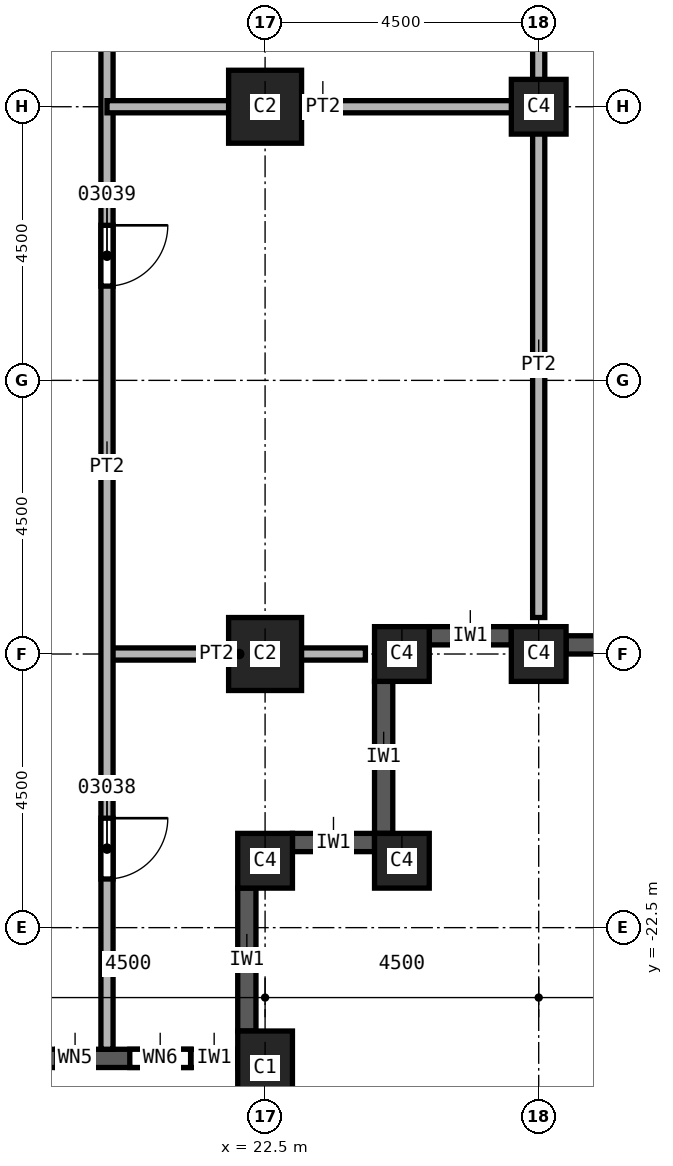
"""IFC4 building model, lengths in metres.
Left out: names, types, materials, properties, quantities, classifications, styles, units other than length and angle.
Written with IfcOpenShell. Run it as: python <this file> out.ifc"""

import sys

from ifc_helpers import new_model, si_unit, direction, frame, frame_2d, origin, origin_2d, place, context, subcontext, project, spatial, rectangle, extrude, element, fill, save


model = new_model("IFC4")
c1 = context("Model", 3, precision=1e-05, world=origin(), true_north=direction((0.0, 1.0)))
c2 = subcontext(c1, "Body", "Model", "MODEL_VIEW")
j1 = project(units=[si_unit("LENGTHUNIT", "METRE"), si_unit("PLANEANGLEUNIT", "RADIAN")], contexts=[c1])
p1 = place(None, origin())
s1 = spatial("IfcSite", under=j1, at=p1, CompositionType="ELEMENT")
p2 = place(p1, origin())
s2 = spatial("IfcBuilding", under=s1, at=p2, CompositionType="ELEMENT")
p3 = place(p2, frame((0.0, 0.0, 92.0)))
s3 = spatial("IfcBuildingStorey", under=s2, at=p3, CompositionType="ELEMENT", Elevation=92.0)
for number, where, z_axis, x_axis in (
    (1, (22.5, -9.0, 0.0), (0.0, 0.0, 1.0), (1.0, 0.0, 0.0)),
    (2, (22.5, -18.0, 0.0), (0.0, 0.0, 1.0), (1.0, 0.0, 0.0)),
):
    element("IfcColumn", number, at=place(p3, frame(where, z_axis=z_axis, x_axis=x_axis)), inside=s3, PredefinedType="COLUMN", context=c2, shape_type="SweptSolid", body=[
        extrude(rectangle(XDim=1.2, YDim=1.2, at=origin_2d()), origin(), (0.0, 0.0, 1.0), 3.7),
    ])
for number, where, z_axis, x_axis in (
    (3, (27.0, -9.0, 0.0), (0.0, 0.0, 1.0), (1.0, 0.0, 0.0)),
    (4, (27.0, -18.0, 0.0), (0.0, 0.0, 1.0), (1.0, 0.0, 0.0)),
):
    element("IfcColumn", number, at=place(p3, frame(where, z_axis=z_axis, x_axis=x_axis)), inside=s3, PredefinedType="COLUMN", context=c2, shape_type="SweptSolid", body=[
        extrude(rectangle(XDim=0.9, YDim=0.9, at=origin_2d()), origin(), (0.0, 0.0, 1.0), 3.7),
    ])
p4 = place(p3, frame((22.5, -24.8, 0.0), z_axis=(0.0, 0.0, 1.0), x_axis=(1.0, 0.0, 0.0)))
e5 = element("IfcColumn", 5, at=p4, inside=s3, PredefinedType="COLUMN", context=c2, shape_type="SweptSolid", body=[
    extrude(rectangle(XDim=0.9, YDim=1.2, at=origin_2d()), origin(), (0.0, 0.0, 1.0), 3.7),
])
for number, where, z_axis, x_axis in (
    (6, (22.5, -21.4, 0.0), (0.0, 0.0, 1.0), (1.0, 0.0, 0.0)),
    (7, (24.75, -21.4, 0.0), (0.0, 0.0, 1.0), (1.0, 0.0, 0.0)),
    (8, (24.75, -18.0, 0.0), (0.0, 0.0, 1.0), (1.0, 0.0, 0.0)),
):
    element("IfcColumn", number, at=place(p3, frame(where, z_axis=z_axis, x_axis=x_axis)), inside=s3, PredefinedType="COLUMN", context=c2, shape_type="SweptSolid", body=[
        extrude(rectangle(XDim=0.9, YDim=0.9, at=origin_2d()), origin(), (0.0, 0.0, 1.0), 3.7),
    ])
p5 = place(p3, frame((18.45, -24.65, 0.0), z_axis=(0.0, 0.0, 1.0), x_axis=(1.0, 0.0, 0.0)))
e9 = element("IfcWall", 9, at=p5, inside=s3, PredefinedType="SOLIDWALL", context=c2, shape_type="SweptSolid", body=[
    extrude(rectangle(XDim=3.6, YDim=0.3, at=frame_2d((1.8, 0.0))), origin(), (0.0, 0.0, 1.0), 3.1),
])
p6 = place(p5, frame((0.625, 0.0, 0.8)))
e10 = element("IfcOpeningElement", 10, at=p6, cuts=e9, PredefinedType="OPENING", context=c2, shape_type="SweptSolid", body=[
    extrude(rectangle(XDim=0.6, YDim=1.95, at=frame_2d((0.3, 0.975))), frame((0.0, 0.15, 0.0), z_axis=(0.0, -1.0, 0.0), x_axis=(1.0, 0.0, 0.0)), (0.0, 0.0, 1.0), 0.3),
])
p7 = place(p5, frame((1.825, 0.0, 0.8)))
e11 = element("IfcOpeningElement", 11, at=p7, cuts=e9, PredefinedType="OPENING", context=c2, shape_type="SweptSolid", body=[
    extrude(rectangle(XDim=1.0, YDim=1.95, at=frame_2d((0.5, 0.975))), frame((0.0, 0.15, 0.0), z_axis=(0.0, -1.0, 0.0), x_axis=(1.0, 0.0, 0.0)), (0.0, 0.0, 1.0), 0.3),
])
p8 = place(p3, frame((22.2, -24.2, 0.0), z_axis=(0.0, 0.0, 1.0), x_axis=(0.0, 1.0, 0.0)))
e12 = element("IfcWall", 12, at=p8, inside=s3, PredefinedType="SOLIDWALL", context=c2, shape_type="SweptSolid", body=[
    extrude(rectangle(XDim=2.35, YDim=0.3, at=frame_2d((1.175, 0.0))), origin(), (0.0, 0.0, 1.0), 3.1),
])
p9 = place(p3, frame((22.95, -21.1, 0.0), z_axis=(0.0, 0.0, 1.0), x_axis=(1.0, 0.0, 0.0)))
e13 = element("IfcWall", 13, at=p9, inside=s3, PredefinedType="SOLIDWALL", context=c2, shape_type="SweptSolid", body=[
    extrude(rectangle(XDim=1.35, YDim=0.3, at=frame_2d((0.675, 0.0))), origin(), (0.0, 0.0, 1.0), 3.1),
])
p10 = place(p3, frame((24.45, -20.95, 0.0), z_axis=(0.0, 0.0, 1.0), x_axis=(0.0, 1.0, 0.0)))
e14 = element("IfcWall", 14, at=p10, inside=s3, PredefinedType="SOLIDWALL", context=c2, shape_type="SweptSolid", body=[
    extrude(rectangle(XDim=2.5, YDim=0.3, at=frame_2d((1.25, 0.0))), origin(), (0.0, 0.0, 1.0), 3.1),
])
p11 = place(p3, frame((25.2, -17.7, 0.0), z_axis=(0.0, 0.0, 1.0), x_axis=(1.0, 0.0, 0.0)))
e15 = element("IfcWall", 15, at=p11, inside=s3, PredefinedType="SOLIDWALL", context=c2, shape_type="SweptSolid", body=[
    extrude(rectangle(XDim=1.35, YDim=0.3, at=frame_2d((0.675, 0.0))), origin(), (0.0, 0.0, 1.0), 3.1),
])
p12 = place(p3, frame((27.45, -17.85, 0.0), z_axis=(0.0, 0.0, 1.0), x_axis=(1.0, 0.0, 0.0)))
e16 = element("IfcWall", 16, at=p12, inside=s3, PredefinedType="SOLIDWALL", context=c2, shape_type="SweptSolid", body=[
    extrude(rectangle(XDim=3.6, YDim=0.3, at=frame_2d((1.8, 0.0))), origin(), (0.0, 0.0, 1.0), 3.1),
])
p13 = place(p12, frame((0.6, 0.0, 0.8)))
e17 = element("IfcOpeningElement", 17, at=p13, cuts=e16, PredefinedType="OPENING", context=c2, shape_type="SweptSolid", body=[
    extrude(rectangle(XDim=2.4, YDim=1.95, at=frame_2d((1.2, 0.975))), frame((0.0, 0.15, 0.0), z_axis=(0.0, -1.0, 0.0), x_axis=(1.0, 0.0, 0.0)), (0.0, 0.0, 1.0), 0.3),
])
p14 = place(p3, frame((19.9, -18.0, 0.0), z_axis=(0.0, 0.0, 1.0), x_axis=(1.0, 0.0, 0.0)))
e18 = element("IfcWall", 18, at=p14, inside=s3, PredefinedType="PARTITIONING", context=c2, shape_type="SweptSolid", body=[
    extrude(rectangle(XDim=4.25, YDim=0.2, at=frame_2d((2.125, 0.0))), origin(), (0.0, 0.0, 1.0), 3.7),
])
p15 = place(p3, frame((19.9, -3.65, 0.0), z_axis=(0.0, 0.0, 1.0), x_axis=(0.0, -1.0, 0.0)))
e19 = element("IfcWall", 19, at=p15, inside=s3, PredefinedType="PARTITIONING", context=c2, shape_type="SweptSolid", body=[
    extrude(rectangle(XDim=20.85, YDim=0.2, at=frame_2d((10.425, 0.0))), origin(), (0.0, 0.0, 1.0), 3.7),
])
p16 = place(p15, frame((17.05, 0.0, 0.0)))
e20 = element("IfcOpeningElement", 20, at=p16, cuts=e19, PredefinedType="OPENING", context=c2, shape_type="SweptSolid", body=[
    extrude(rectangle(XDim=1.0, YDim=2.1, at=frame_2d((0.5, 1.05))), frame((0.0, 0.1, 0.0), z_axis=(0.0, -1.0, 0.0), x_axis=(1.0, 0.0, 0.0)), (0.0, 0.0, 1.0), 0.2),
])
p17 = place(p15, frame((7.3, 0.0, 0.0)))
e21 = element("IfcOpeningElement", 21, at=p17, cuts=e19, PredefinedType="OPENING", context=c2, shape_type="SweptSolid", body=[
    extrude(rectangle(XDim=1.0, YDim=2.1, at=frame_2d((0.5, 1.05))), frame((0.0, 0.1, 0.0), z_axis=(0.0, -1.0, 0.0), x_axis=(1.0, 0.0, 0.0)), (0.0, 0.0, 1.0), 0.2),
])
p18 = place(p3, frame((19.9, -9.0, 0.0), z_axis=(0.0, 0.0, 1.0), x_axis=(1.0, 0.0, 0.0)))
e22 = element("IfcWall", 22, at=p18, inside=s3, PredefinedType="PARTITIONING", context=c2, shape_type="SweptSolid", body=[
    extrude(rectangle(XDim=7.2, YDim=0.2, at=frame_2d((3.6, 0.0))), origin(), (0.0, 0.0, 1.0), 3.7),
])
p19 = place(p3, frame((27.0, -3.75, 0.0), z_axis=(0.0, 0.0, 1.0), x_axis=(0.0, -1.0, 0.0)))
e23 = element("IfcWall", 23, at=p19, inside=s3, PredefinedType="PARTITIONING", context=c2, shape_type="SweptSolid", body=[
    extrude(rectangle(XDim=13.65, YDim=0.2, at=frame_2d((6.825, 0.0))), origin(), (0.0, 0.0, 1.0), 3.7),
])
p20 = place(p16, origin())
e24 = element("IfcDoor", 24, at=p20, inside=s3, OperationType="SINGLE_SWING_LEFT", PredefinedType="DOOR", context=c2, shape_type="SweptSolid", body=[
    extrude(rectangle(XDim=1.0, YDim=2.1, at=frame_2d((0.5, 1.05))), frame((0.0, 0.025, 0.0), z_axis=(0.0, -1.0, 0.0), x_axis=(1.0, 0.0, 0.0)), (0.0, 0.0, 1.0), 0.05),
])
fill(e20, e24)
p21 = place(p17, origin())
e25 = element("IfcDoor", 25, at=p21, inside=s3, OperationType="SINGLE_SWING_RIGHT", PredefinedType="DOOR", context=c2, shape_type="SweptSolid", body=[
    extrude(rectangle(XDim=1.0, YDim=2.1, at=frame_2d((0.5, 1.05))), frame((0.0, 0.025, 0.0), z_axis=(0.0, -1.0, 0.0), x_axis=(1.0, 0.0, 0.0)), (0.0, 0.0, 1.0), 0.05),
])
fill(e21, e25)
p22 = place(p6, origin())
e26 = element("IfcWindow", 26, at=p22, inside=s3, PartitioningType="SINGLE_PANEL", PredefinedType="WINDOW", context=c2, shape_type="SweptSolid", body=[
    extrude(rectangle(XDim=0.6, YDim=1.95, at=frame_2d((0.3, 0.975))), frame((0.0, 0.03, 0.0), z_axis=(0.0, -1.0, 0.0), x_axis=(1.0, 0.0, 0.0)), (0.0, 0.0, 1.0), 0.06),
])
fill(e10, e26)
p23 = place(p7, origin())
e27 = element("IfcWindow", 27, at=p23, inside=s3, PartitioningType="SINGLE_PANEL", PredefinedType="WINDOW", context=c2, shape_type="SweptSolid", body=[
    extrude(rectangle(XDim=1.0, YDim=1.95, at=frame_2d((0.5, 0.975))), frame((0.0, 0.03, 0.0), z_axis=(0.0, -1.0, 0.0), x_axis=(1.0, 0.0, 0.0)), (0.0, 0.0, 1.0), 0.06),
])
fill(e11, e27)
save(model, sys.argv[1])
